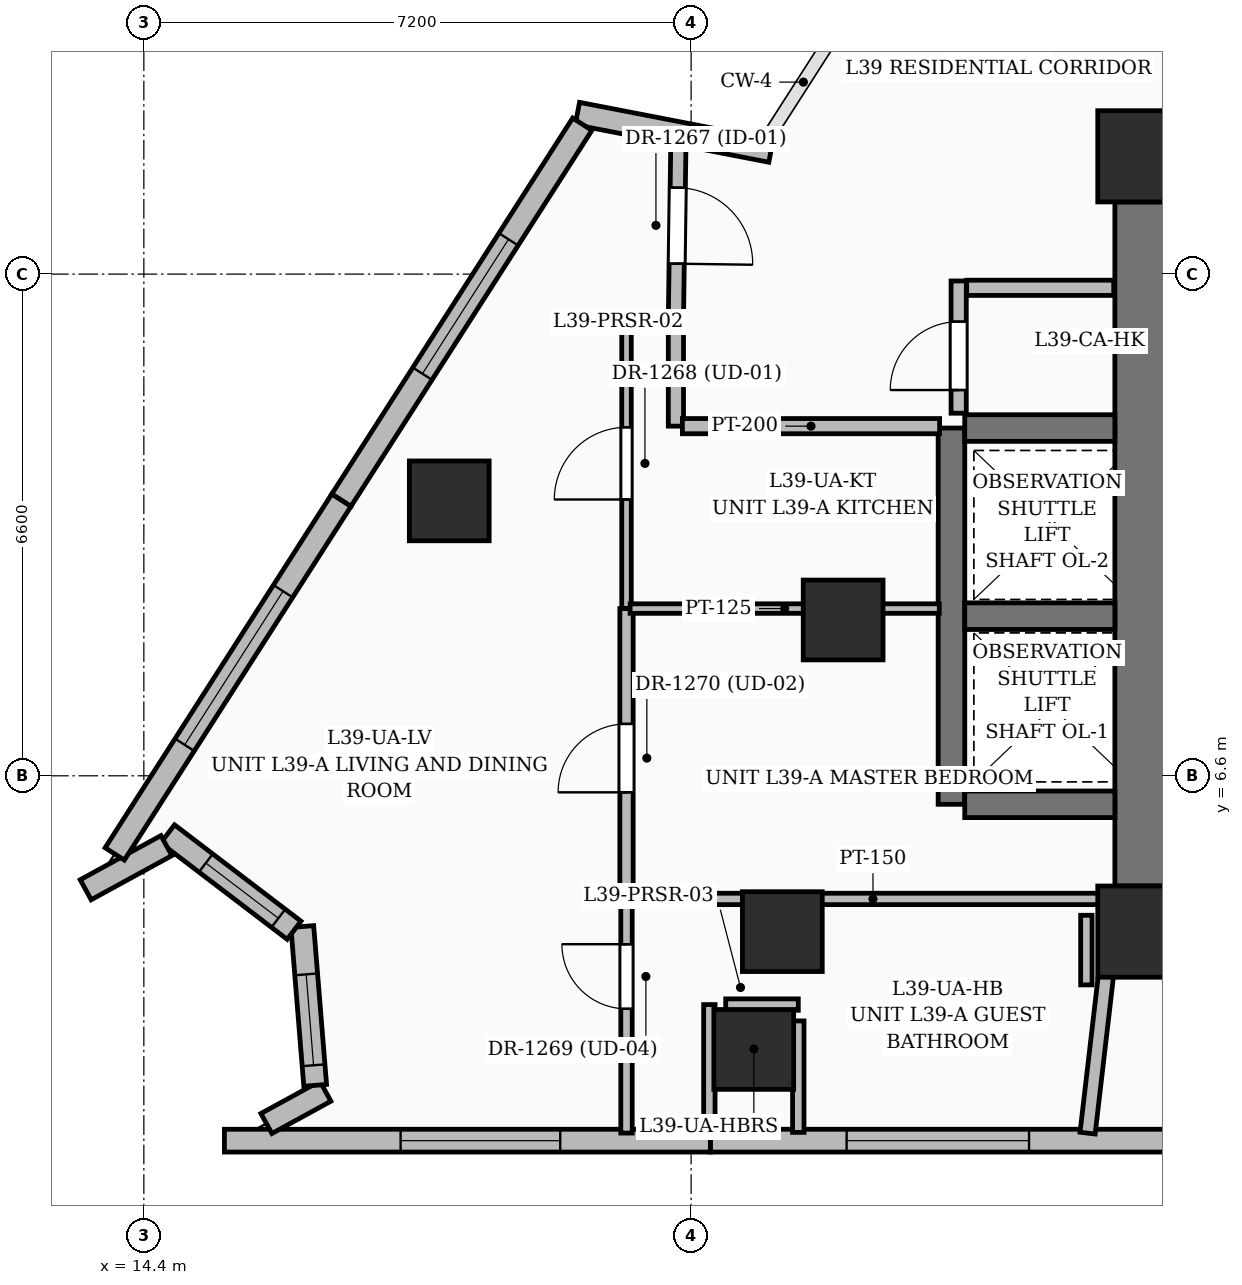
"""IFC4 building model, lengths in metres.
Left out: names, types, materials, properties, quantities, classifications, styles, units other than length and angle.
Written with IfcOpenShell. Run it as: python <this file> out.ifc"""

import sys

from ifc_helpers import new_model, si_unit, direction, frame, frame_2d, origin, origin_2d, place, context, subcontext, project, spatial, rectangle, extrude, element, fill, save


model = new_model("IFC4")
c1 = context("Model", 3, precision=1e-05, world=origin(), true_north=direction((0.0, 1.0)))
c2 = subcontext(c1, "Body", "Model", "MODEL_VIEW")
j1 = project(units=[si_unit("LENGTHUNIT", "METRE"), si_unit("PLANEANGLEUNIT", "RADIAN")], contexts=[c1])
p1 = place(None, origin())
s1 = spatial("IfcSite", under=j1, at=p1, CompositionType="ELEMENT")
p2 = place(p1, origin())
s2 = spatial("IfcBuilding", under=s1, at=p2, CompositionType="ELEMENT")
p3 = place(p2, frame((0.0, 0.0, 153.6)))
s3 = spatial("IfcBuildingStorey", under=s2, at=p3, CompositionType="ELEMENT", Elevation=153.6)
for number, where, z_axis, x_axis in (
    (1, (27.55, 4.55, 0.0), (0.0, 0.0, 1.0), (1.0, 0.0, 0.0)),
    (2, (27.55, 14.75, 0.0), (0.0, 0.0, 1.0), (1.0, 0.0, 0.0)),
):
    element("IfcColumn", number, at=place(p3, frame(where, z_axis=z_axis, x_axis=x_axis)), inside=s3, PredefinedType="COLUMN", context=c2, shape_type="SweptSolid", body=[
        extrude(rectangle(XDim=1.2, YDim=1.2, at=origin_2d()), origin(), (0.0, 0.0, 1.0), 3.6),
    ])
for number, where, z_axis, x_axis in (
    (3, (22.8, 4.55, 0.0), (0.0, 0.0, 1.0), (1.0, 0.0, 0.0)),
    (4, (23.6, 8.65, 0.0), (0.0, 0.0, 1.0), (1.0, 0.0, 0.0)),
):
    element("IfcColumn", number, at=place(p3, frame(where, z_axis=z_axis, x_axis=x_axis)), inside=s3, PredefinedType="COLUMN", context=c2, shape_type="SweptSolid", body=[
        extrude(rectangle(XDim=1.05, YDim=1.05, at=origin_2d()), origin(), (0.0, 0.0, 1.0), 3.6),
    ])
p4 = place(p3, frame((27.55, 5.15, 0.0), z_axis=(0.0, 0.0, 1.0), x_axis=(0.0, 1.0, 0.0)))
e5 = element("IfcWall", 5, at=p4, inside=s3, PredefinedType="SHEAR", context=c2, shape_type="SweptSolid", body=[
    extrude(rectangle(XDim=9.0, YDim=0.75, at=frame_2d((4.5, 0.0))), origin(), (0.0, 0.0, 1.0), 3.6),
])
p5 = place(p3, frame((25.025, 6.225, 0.0), z_axis=(0.0, 0.0, 1.0), x_axis=(0.0, 1.0, 0.0)))
e6 = element("IfcWall", 6, at=p5, inside=s3, PredefinedType="SOLIDWALL", context=c2, shape_type="SweptSolid", body=[
    extrude(rectangle(XDim=4.95, YDim=0.35, at=frame_2d((2.475, 0.0))), origin(), (0.0, 0.0, 1.0), 3.6),
])
for number, where, z_axis, x_axis in (
    (7, (25.2, 6.225, 0.0), (0.0, 0.0, 1.0), (1.0, 0.0, 0.0)),
    (8, (25.2, 8.7, 0.0), (0.0, 0.0, 1.0), (1.0, 0.0, 0.0)),
    (9, (25.2, 11.175, 0.0), (0.0, 0.0, 1.0), (1.0, 0.0, 0.0)),
):
    element("IfcWall", number, at=place(p3, frame(where, z_axis=z_axis, x_axis=x_axis)), inside=s3, PredefinedType="SOLIDWALL", context=c2, shape_type="SweptSolid", body=[
        extrude(rectangle(XDim=1.975, YDim=0.35, at=frame_2d((0.988, 0.0))), origin(), (0.0, 0.0, 1.0), 3.6),
    ])
for number, where, z_axis, x_axis in (
    (10, (22.424, 3.0, 0.0), (0.0, 0.0, 1.0), (1.0, 0.0, 0.0)),
    (11, (18.418, 10.217, 0.0), (0.0, 0.0, 1.0), (1.0, 0.0, 0.0)),
):
    element("IfcColumn", number, at=place(p3, frame(where, z_axis=z_axis, x_axis=x_axis)), inside=s3, PredefinedType="COLUMN", context=c2, shape_type="SweptSolid", body=[
        extrude(rectangle(XDim=1.05, YDim=1.05, at=origin_2d()), origin(), (0.0, 0.0, 1.0), 3.6),
    ])
p6 = place(p3, frame((20.104, 15.312, 0.0), z_axis=(0.0, 0.0, 1.0), x_axis=(0.98176398898, -0.190103839891, 0.0)))
e12 = element("IfcWall", 12, at=p6, inside=s3, PredefinedType="SOLIDWALL", context=c2, shape_type="SweptSolid", body=[
    extrude(rectangle(XDim=2.594, YDim=0.3, at=frame_2d((1.297, 0.0))), origin(), (0.0, 0.0, 1.0), 2.575),
])
p7 = place(p3, frame((28.246, 1.8, 0.0), z_axis=(0.0, 0.0, 1.0), x_axis=(-1.0, 0.0, 0.0)))
e13 = element("IfcWall", 13, at=p7, inside=s3, PredefinedType="SOLIDWALL", context=c2, shape_type="SweptSolid", body=[
    extrude(rectangle(XDim=6.393, YDim=0.3, at=frame_2d((3.197, 0.0))), origin(), (0.0, 0.0, 1.0), 3.35),
])
p8 = place(p7, frame((2.2, 0.0, 0.6)))
e14 = element("IfcOpeningElement", 14, at=p8, cuts=e13, PredefinedType="OPENING", context=c2, shape_type="SweptSolid", body=[
    extrude(rectangle(XDim=2.4, YDim=2.1, at=frame_2d((1.2, 1.05))), frame((0.0, 0.16, 0.0), z_axis=(0.0, -1.0, 0.0), x_axis=(1.0, 0.0, 0.0)), (0.0, 0.0, 1.0), 0.32),
])
p9 = place(p3, frame((21.853, 1.8, 0.0), z_axis=(0.0, 0.0, 1.0), x_axis=(-1.0, 0.0, 0.0)))
e15 = element("IfcWall", 15, at=p9, inside=s3, PredefinedType="SOLIDWALL", context=c2, shape_type="SweptSolid", body=[
    extrude(rectangle(XDim=6.393, YDim=0.3, at=frame_2d((3.197, 0.0))), origin(), (0.0, 0.0, 1.0), 3.35),
])
p10 = place(p9, frame((1.975, 0.0, 0.55)))
e16 = element("IfcOpeningElement", 16, at=p10, cuts=e15, PredefinedType="OPENING", context=c2, shape_type="SweptSolid", body=[
    extrude(rectangle(XDim=2.1, YDim=2.4, at=frame_2d((1.05, 1.2))), frame((0.0, 0.16, 0.0), z_axis=(0.0, -1.0, 0.0), x_axis=(1.0, 0.0, 0.0)), (0.0, 0.0, 1.0), 0.32),
])
p11 = place(p3, frame((16.012, 2.025, 0.0), z_axis=(0.0, 0.0, 1.0), x_axis=(0.877262241919, 0.480011415389, 0.0)))
e17 = element("IfcWall", 17, at=p11, inside=s3, PredefinedType="SOLIDWALL", context=c2, shape_type="SweptSolid", body=[
    extrude(rectangle(XDim=0.885, YDim=0.3, at=frame_2d((0.442, 0.0))), origin(), (0.0, 0.0, 1.0), 3.35),
])
p12 = place(p3, frame((16.654, 2.528, 0.0), z_axis=(0.0, 0.0, 1.0), x_axis=(-0.080962879454, 0.996717117416, 0.0)))
e18 = element("IfcWall", 18, at=p12, inside=s3, PredefinedType="SOLIDWALL", context=c2, shape_type="SweptSolid", body=[
    extrude(rectangle(XDim=2.096, YDim=0.3, at=frame_2d((1.048, 0.0))), origin(), (0.0, 0.0, 1.0), 3.35),
])
p13 = place(p12, frame((0.265, 0.0, 0.8)))
e19 = element("IfcOpeningElement", 19, at=p13, cuts=e18, PredefinedType="OPENING", context=c2, shape_type="SweptSolid", body=[
    extrude(rectangle(XDim=1.2, YDim=1.8, at=frame_2d((0.6, 0.9))), frame((0.0, 0.16, 0.0), z_axis=(0.0, -1.0, 0.0), x_axis=(1.0, 0.0, 0.0)), (0.0, 0.0, 1.0), 0.32),
])
p14 = place(p3, frame((16.377, 4.568, 0.0), z_axis=(0.0, 0.0, 1.0), x_axis=(-0.795383499791, 0.606106499107, 0.0)))
e20 = element("IfcWall", 20, at=p14, inside=s3, PredefinedType="SOLIDWALL", context=c2, shape_type="SweptSolid", body=[
    extrude(rectangle(XDim=2.092, YDim=0.3, at=frame_2d((1.046, 0.0))), origin(), (0.0, 0.0, 1.0), 3.35),
])
p15 = place(p14, frame((0.26, 0.0, 0.8)))
e21 = element("IfcOpeningElement", 21, at=p15, cuts=e20, PredefinedType="OPENING", context=c2, shape_type="SweptSolid", body=[
    extrude(rectangle(XDim=1.2, YDim=1.8, at=frame_2d((0.6, 0.9))), frame((0.0, 0.16, 0.0), z_axis=(0.0, -1.0, 0.0), x_axis=(1.0, 0.0, 0.0)), (0.0, 0.0, 1.0), 0.32),
])
p16 = place(p3, frame((14.697, 5.681, 0.0), z_axis=(0.0, 0.0, 1.0), x_axis=(-0.877355211776, -0.47984146587, 0.0)))
e22 = element("IfcWall", 22, at=p16, inside=s3, PredefinedType="SOLIDWALL", context=c2, shape_type="SweptSolid", body=[
    extrude(rectangle(XDim=1.21, YDim=0.3, at=frame_2d((0.605, 0.0))), origin(), (0.0, 0.0, 1.0), 3.35),
])
p17 = place(p3, frame((14.017, 5.572, 0.0), z_axis=(0.0, 0.0, 1.0), x_axis=(0.539464660722, 0.84200824214, 0.0)))
e23 = element("IfcWall", 23, at=p17, inside=s3, PredefinedType="SOLIDWALL", context=c2, shape_type="SweptSolid", body=[
    extrude(rectangle(XDim=5.529, YDim=0.3, at=frame_2d((2.764, 0.0))), origin(), (0.0, 0.0, 1.0), 3.35),
])
p18 = place(p17, frame((1.705, 0.0, 0.6)))
e24 = element("IfcOpeningElement", 24, at=p18, cuts=e23, PredefinedType="OPENING", context=c2, shape_type="SweptSolid", body=[
    extrude(rectangle(XDim=2.4, YDim=2.1, at=frame_2d((1.2, 1.05))), frame((0.0, 0.16, 0.0), z_axis=(0.0, -1.0, 0.0), x_axis=(1.0, 0.0, 0.0)), (0.0, 0.0, 1.0), 0.32),
])
p19 = place(p3, frame((17.0, 10.227, 0.0), z_axis=(0.0, 0.0, 1.0), x_axis=(0.539500668401, 0.841985171363, 0.0)))
e25 = element("IfcWall", 25, at=p19, inside=s3, PredefinedType="SOLIDWALL", context=c2, shape_type="SweptSolid", body=[
    extrude(rectangle(XDim=5.873, YDim=0.3, at=frame_2d((2.937, 0.0))), origin(), (0.0, 0.0, 1.0), 3.35),
])
p20 = place(p19, frame((1.975, 0.0, 0.55)))
e26 = element("IfcOpeningElement", 26, at=p20, cuts=e25, PredefinedType="OPENING", context=c2, shape_type="SweptSolid", body=[
    extrude(rectangle(XDim=2.1, YDim=2.4, at=frame_2d((1.05, 1.2))), frame((0.0, 0.16, 0.0), z_axis=(0.0, -1.0, 0.0), x_axis=(1.0, 0.0, 0.0)), (0.0, 0.0, 1.0), 0.32),
])
p21 = place(p3, frame((25.12, 11.37, 0.0), z_axis=(0.0, 0.0, 1.0), x_axis=(0.0, 1.0, 0.0)))
e27 = element("IfcWall", 27, at=p21, inside=s3, PredefinedType="PARTITIONING", context=c2, shape_type="SweptSolid", body=[
    extrude(rectangle(XDim=1.74, YDim=0.2, at=frame_2d((0.87, 0.0))), origin(), (0.0, 0.0, 1.0), 3.35),
])
p22 = place(p21, frame((0.305, 0.0, 0.0)))
e28 = element("IfcOpeningElement", 28, at=p22, cuts=e27, PredefinedType="OPENING", context=c2, shape_type="SweptSolid", body=[
    extrude(rectangle(XDim=0.9, YDim=2.1, at=frame_2d((0.45, 1.05))), frame((0.0, 0.11, 0.0), z_axis=(0.0, -1.0, 0.0), x_axis=(1.0, 0.0, 0.0)), (0.0, 0.0, 1.0), 0.22),
])
p23 = place(p3, frame((25.225, 13.02, 0.0), z_axis=(0.0, 0.0, 1.0), x_axis=(1.0, 0.0, 0.0)))
e29 = element("IfcWall", 29, at=p23, inside=s3, PredefinedType="PARTITIONING", context=c2, shape_type="SweptSolid", body=[
    extrude(rectangle(XDim=1.935, YDim=0.2, at=frame_2d((0.967, 0.0))), origin(), (0.0, 0.0, 1.0), 3.35),
])
p24 = place(p3, frame((21.433, 14.956, 0.0), z_axis=(0.0, 0.0, 1.0), x_axis=(-0.014212611143, -0.999898995741, 0.0)))
e30 = element("IfcWall", 30, at=p24, inside=s3, PredefinedType="PARTITIONING", context=c2, shape_type="SweptSolid", body=[
    extrude(rectangle(XDim=2.336, YDim=0.2, at=frame_2d((1.168, 0.0))), origin(), (0.0, 0.0, 1.0), 2.57),
])
p25 = place(p24, frame((0.619, 0.0, 0.0)))
e31 = element("IfcOpeningElement", 31, at=p25, cuts=e30, PredefinedType="OPENING", context=c2, shape_type="SweptSolid", body=[
    extrude(rectangle(XDim=1.0, YDim=2.2, at=frame_2d((0.5, 1.1))), frame((0.0, 0.11, 0.0), z_axis=(0.0, -1.0, 0.0), x_axis=(1.0, 0.0, 0.0)), (0.0, 0.0, 1.0), 0.22),
])
p26 = place(p3, frame((21.4, 12.62, 0.0), z_axis=(0.0, 0.0, 1.0), x_axis=(0.0, -1.0, 0.0)))
e32 = element("IfcWall", 32, at=p26, inside=s3, PredefinedType="PARTITIONING", context=c2, shape_type="SweptSolid", body=[
    extrude(rectangle(XDim=1.42, YDim=0.2, at=frame_2d((0.71, 0.0))), origin(), (0.0, 0.0, 1.0), 3.35),
])
p27 = place(p3, frame((21.485, 11.2, 0.0), z_axis=(0.0, 0.0, 1.0), x_axis=(1.0, 0.0, 0.0)))
e33 = element("IfcWall", 33, at=p27, inside=s3, PredefinedType="PARTITIONING", context=c2, shape_type="SweptSolid", body=[
    extrude(rectangle(XDim=3.384, YDim=0.2, at=frame_2d((1.692, 0.0))), origin(), (0.0, 0.0, 1.0), 3.35),
])
p28 = place(p3, frame((20.75, 1.9, 0.0), z_axis=(0.0, 0.0, 1.0), x_axis=(0.0, 1.0, 0.0)))
e34 = element("IfcWall", 34, at=p28, inside=s3, PredefinedType="PARTITIONING", context=c2, shape_type="SweptSolid", body=[
    extrude(rectangle(XDim=3.08, YDim=0.15, at=frame_2d((1.54, 0.0))), origin(), (0.0, 0.0, 1.0), 3.35),
])
p29 = place(p28, frame((1.635, 0.0, 0.0)))
e35 = element("IfcOpeningElement", 35, at=p29, cuts=e34, PredefinedType="OPENING", context=c2, shape_type="SweptSolid", body=[
    extrude(rectangle(XDim=0.85, YDim=2.1, at=frame_2d((0.425, 1.05))), frame((0.0, 0.085, 0.0), z_axis=(0.0, -1.0, 0.0), x_axis=(1.0, 0.0, 0.0)), (0.0, 0.0, 1.0), 0.17),
])
p30 = place(p3, frame((20.75, 8.8, 0.0), z_axis=(0.0, 0.0, 1.0), x_axis=(0.0, 1.0, 0.0)))
e36 = element("IfcWall", 36, at=p30, inside=s3, PredefinedType="PARTITIONING", context=c2, shape_type="SweptSolid", body=[
    extrude(rectangle(XDim=3.82, YDim=0.125, at=frame_2d((1.91, 0.0))), origin(), (0.0, 0.0, 1.0), 2.393),
])
p31 = place(p30, frame((1.435, 0.0, 0.0)))
e37 = element("IfcOpeningElement", 37, at=p31, cuts=e36, PredefinedType="OPENING", context=c2, shape_type="SweptSolid", body=[
    extrude(rectangle(XDim=0.95, YDim=2.2, at=frame_2d((0.475, 1.1))), frame((0.0, 0.072, 0.0), z_axis=(0.0, -1.0, 0.0), x_axis=(1.0, 0.0, 0.0)), (0.0, 0.0, 1.0), 0.145),
])
p32 = place(p3, frame((20.798, 12.62, 0.0), z_axis=(0.0, 0.0, 1.0), x_axis=(1.0, 0.0, 0.0)))
e38 = element("IfcWall", 38, at=p32, inside=s3, PredefinedType="PARTITIONING", context=c2, shape_type="SweptSolid", body=[
    extrude(rectangle(XDim=0.517, YDim=0.125, at=frame_2d((0.259, 0.0))), origin(), (0.0, 0.0, 1.0), 3.35),
])
p33 = place(p3, frame((20.75, 4.98, 0.0), z_axis=(0.0, 0.0, 1.0), x_axis=(0.0, 1.0, 0.0)))
e39 = element("IfcWall", 39, at=p33, inside=s3, PredefinedType="PARTITIONING", context=c2, shape_type="SweptSolid", body=[
    extrude(rectangle(XDim=3.82, YDim=0.175, at=frame_2d((1.91, 0.0))), origin(), (0.0, 0.0, 1.0), 2.57),
])
p34 = place(p33, frame((1.403, 0.0, 0.0)))
e40 = element("IfcOpeningElement", 40, at=p34, cuts=e39, PredefinedType="OPENING", context=c2, shape_type="SweptSolid", body=[
    extrude(rectangle(XDim=0.9, YDim=2.15, at=frame_2d((0.45, 1.075))), frame((0.0, 0.097, 0.0), z_axis=(0.0, -1.0, 0.0), x_axis=(1.0, 0.0, 0.0)), (0.0, 0.0, 1.0), 0.195),
])
p35 = place(p3, frame((27.175, 4.98, 0.0), z_axis=(0.0, 0.0, 1.0), x_axis=(-1.0, 0.0, 0.0)))
e41 = element("IfcWall", 41, at=p35, inside=s3, PredefinedType="PARTITIONING", context=c2, shape_type="SweptSolid", body=[
    extrude(rectangle(XDim=6.365, YDim=0.15, at=frame_2d((3.183, 0.0))), origin(), (0.0, 0.0, 1.0), 2.57),
])
p36 = place(p3, frame((26.816, 1.899, 0.0), z_axis=(0.0, 0.0, 1.0), x_axis=(0.115732894013, 0.993280371921, 0.0)))
e42 = element("IfcWall", 42, at=p36, inside=s3, PredefinedType="PARTITIONING", context=c2, shape_type="SweptSolid", body=[
    extrude(rectangle(XDim=3.042, YDim=0.2, at=frame_2d((1.521, 0.0))), origin(), (0.0, 0.0, 1.0), 2.57),
])
p37 = place(p3, frame((20.798, 8.8, 0.0), z_axis=(0.0, 0.0, 1.0), x_axis=(1.0, 0.0, 0.0)))
e43 = element("IfcWall", 43, at=p37, inside=s3, PredefinedType="PARTITIONING", context=c2, shape_type="SweptSolid", body=[
    extrude(rectangle(XDim=4.067, YDim=0.125, at=frame_2d((2.034, 0.0))), origin(), (0.0, 0.0, 1.0), 2.393),
])
p38 = place(p3, frame((22.2, 1.889, 0.0), z_axis=(0.0, 0.0, 1.0), x_axis=(0.0, 1.0, 0.0)))
e44 = element("IfcWall", 44, at=p38, inside=s3, PredefinedType="PARTITIONING", context=c2, shape_type="SweptSolid", body=[
    extrude(rectangle(XDim=0.02, YDim=0.15, at=frame_2d((0.01, 0.0))), origin(), (0.0, 0.0, 1.0), 3.35),
])
p39 = place(p3, frame((21.84, 1.909, 0.0), z_axis=(0.0, 0.0, 1.0), x_axis=(0.0, 1.0, 0.0)))
e45 = element("IfcWall", 45, at=p39, inside=s3, PredefinedType="PARTITIONING", context=c2, shape_type="SweptSolid", body=[
    extrude(rectangle(XDim=1.681, YDim=0.15, at=frame_2d((0.841, 0.0))), origin(), (0.0, 0.0, 1.0), 2.57),
])
p40 = place(p3, frame((22.055, 3.59, 0.0), z_axis=(0.0, 0.0, 1.0), x_axis=(1.0, 0.0, 0.0)))
e46 = element("IfcWall", 46, at=p40, inside=s3, PredefinedType="PARTITIONING", context=c2, shape_type="SweptSolid", body=[
    extrude(rectangle(XDim=0.955, YDim=0.15, at=frame_2d((0.478, 0.0))), origin(), (0.0, 0.0, 1.0), 2.57),
])
p41 = place(p3, frame((23.01, 3.375, 0.0), z_axis=(0.0, 0.0, 1.0), x_axis=(0.0, -1.0, 0.0)))
e47 = element("IfcWall", 47, at=p41, inside=s3, PredefinedType="PARTITIONING", context=c2, shape_type="SweptSolid", body=[
    extrude(rectangle(XDim=1.466, YDim=0.15, at=frame_2d((0.733, 0.0))), origin(), (0.0, 0.0, 1.0), 2.57),
])
p42 = place(p3, frame((22.64, 1.909, 0.0), z_axis=(0.0, 0.0, 1.0), x_axis=(0.0, -1.0, 0.0)))
e48 = element("IfcWall", 48, at=p42, inside=s3, PredefinedType="PARTITIONING", context=c2, shape_type="SweptSolid", body=[
    extrude(rectangle(XDim=0.02, YDim=0.15, at=frame_2d((0.01, 0.0))), origin(), (0.0, 0.0, 1.0), 3.35),
])
p43 = place(p3, frame((26.8, 3.849, 0.0), z_axis=(0.0, 0.0, 1.0), x_axis=(0.0, 1.0, 0.0)))
e49 = element("IfcWall", 49, at=p43, inside=s3, PredefinedType="PARTITIONING", context=c2, shape_type="SweptSolid", body=[
    extrude(rectangle(XDim=0.916, YDim=0.15, at=frame_2d((0.458, 0.0))), origin(), (0.0, 0.0, 1.0), 2.436),
])
p44 = place(p8, origin())
e50 = element("IfcWindow", 50, at=p44, inside=s3, PartitioningType="SINGLE_PANEL", PredefinedType="WINDOW", context=c2, shape_type="SweptSolid", body=[
    extrude(rectangle(XDim=2.4, YDim=2.1, at=frame_2d((1.2, 1.05))), frame((0.0, 0.03, 0.0), z_axis=(0.0, -1.0, 0.0), x_axis=(1.0, 0.0, 0.0)), (0.0, 0.0, 1.0), 0.06),
])
fill(e14, e50)
p45 = place(p10, origin())
e51 = element("IfcWindow", 51, at=p45, inside=s3, PartitioningType="SINGLE_PANEL", PredefinedType="WINDOW", context=c2, shape_type="SweptSolid", body=[
    extrude(rectangle(XDim=2.1, YDim=2.4, at=frame_2d((1.05, 1.2))), frame((0.0, 0.03, 0.0), z_axis=(0.0, -1.0, 0.0), x_axis=(1.0, 0.0, 0.0)), (0.0, 0.0, 1.0), 0.06),
])
fill(e16, e51)
p46 = place(p13, origin())
e52 = element("IfcWindow", 52, at=p46, inside=s3, PartitioningType="SINGLE_PANEL", PredefinedType="WINDOW", context=c2, shape_type="SweptSolid", body=[
    extrude(rectangle(XDim=1.2, YDim=1.8, at=frame_2d((0.6, 0.9))), frame((0.0, 0.03, 0.0), z_axis=(0.0, -1.0, 0.0), x_axis=(1.0, 0.0, 0.0)), (0.0, 0.0, 1.0), 0.06),
])
fill(e19, e52)
p47 = place(p15, origin())
e53 = element("IfcWindow", 53, at=p47, inside=s3, PartitioningType="SINGLE_PANEL", PredefinedType="WINDOW", context=c2, shape_type="SweptSolid", body=[
    extrude(rectangle(XDim=1.2, YDim=1.8, at=frame_2d((0.6, 0.9))), frame((0.0, 0.03, 0.0), z_axis=(0.0, -1.0, 0.0), x_axis=(1.0, 0.0, 0.0)), (0.0, 0.0, 1.0), 0.06),
])
fill(e21, e53)
p48 = place(p18, origin())
e54 = element("IfcWindow", 54, at=p48, inside=s3, PartitioningType="SINGLE_PANEL", PredefinedType="WINDOW", context=c2, shape_type="SweptSolid", body=[
    extrude(rectangle(XDim=2.4, YDim=2.1, at=frame_2d((1.2, 1.05))), frame((0.0, 0.03, 0.0), z_axis=(0.0, -1.0, 0.0), x_axis=(1.0, 0.0, 0.0)), (0.0, 0.0, 1.0), 0.06),
])
fill(e24, e54)
p49 = place(p20, origin())
e55 = element("IfcWindow", 55, at=p49, inside=s3, PartitioningType="SINGLE_PANEL", PredefinedType="WINDOW", context=c2, shape_type="SweptSolid", body=[
    extrude(rectangle(XDim=2.1, YDim=2.4, at=frame_2d((1.05, 1.2))), frame((0.0, 0.03, 0.0), z_axis=(0.0, -1.0, 0.0), x_axis=(1.0, 0.0, 0.0)), (0.0, 0.0, 1.0), 0.06),
])
fill(e26, e55)
p50 = place(p22, origin())
e56 = element("IfcDoor", 56, at=p50, inside=s3, OperationType="SINGLE_SWING_LEFT", PredefinedType="DOOR", context=c2, shape_type="SweptSolid", body=[
    extrude(rectangle(XDim=0.9, YDim=2.1, at=frame_2d((0.45, 1.05))), frame((0.0, 0.025, 0.0), z_axis=(0.0, -1.0, 0.0), x_axis=(1.0, 0.0, 0.0)), (0.0, 0.0, 1.0), 0.05),
])
fill(e28, e56)
p51 = place(p25, origin())
e57 = element("IfcDoor", 57, at=p51, inside=s3, OperationType="SINGLE_SWING_RIGHT", PredefinedType="DOOR", context=c2, shape_type="SweptSolid", body=[
    extrude(rectangle(XDim=1.0, YDim=2.2, at=frame_2d((0.5, 1.1))), frame((0.0, 0.025, 0.0), z_axis=(0.0, -1.0, 0.0), x_axis=(1.0, 0.0, 0.0)), (0.0, 0.0, 1.0), 0.05),
])
fill(e31, e57)
p52 = place(p31, origin())
e58 = element("IfcDoor", 58, at=p52, inside=s3, OperationType="SINGLE_SWING_LEFT", PredefinedType="DOOR", context=c2, shape_type="SweptSolid", body=[
    extrude(rectangle(XDim=0.95, YDim=2.2, at=frame_2d((0.475, 1.1))), frame((0.0, 0.025, 0.0), z_axis=(0.0, -1.0, 0.0), x_axis=(1.0, 0.0, 0.0)), (0.0, 0.0, 1.0), 0.05),
])
fill(e37, e58)
p53 = place(p29, origin())
e59 = element("IfcDoor", 59, at=p53, inside=s3, OperationType="SINGLE_SWING_RIGHT", PredefinedType="DOOR", context=c2, shape_type="SweptSolid", body=[
    extrude(rectangle(XDim=0.85, YDim=2.1, at=frame_2d((0.425, 1.05))), frame((0.0, 0.025, 0.0), z_axis=(0.0, -1.0, 0.0), x_axis=(1.0, 0.0, 0.0)), (0.0, 0.0, 1.0), 0.05),
])
fill(e35, e59)
p54 = place(p34, origin())
e60 = element("IfcDoor", 60, at=p54, inside=s3, OperationType="SINGLE_SWING_LEFT", PredefinedType="DOOR", context=c2, shape_type="SweptSolid", body=[
    extrude(rectangle(XDim=0.9, YDim=2.15, at=frame_2d((0.45, 1.075))), frame((0.0, 0.025, 0.0), z_axis=(0.0, -1.0, 0.0), x_axis=(1.0, 0.0, 0.0)), (0.0, 0.0, 1.0), 0.05),
])
fill(e40, e60)
save(model, sys.argv[1])
